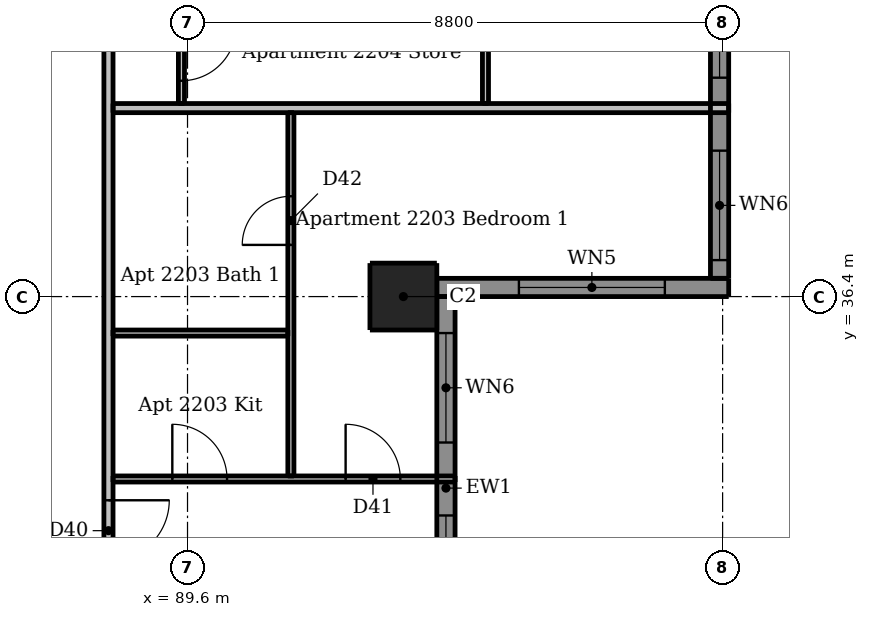
"""IFC4 building model, lengths in metres.
Left out: names, types, materials, properties, quantities, classifications, styles, units other than length and angle.
Written with IfcOpenShell. Run it as: python <this file> out.ifc"""

import sys

from ifc_helpers import new_model, si_unit, direction, frame, frame_2d, origin, origin_2d, place, context, subcontext, project, spatial, rectangle, extrude, element, fill, save


model = new_model("IFC4")
c1 = context("Model", 3, precision=1e-05, world=origin(), true_north=direction((0.0, 1.0)))
c2 = subcontext(c1, "Body", "Model", "MODEL_VIEW")
j1 = project(units=[si_unit("LENGTHUNIT", "METRE"), si_unit("PLANEANGLEUNIT", "RADIAN")], contexts=[c1])
p1 = place(None, origin())
s1 = spatial("IfcSite", under=j1, at=p1, CompositionType="ELEMENT")
p2 = place(p1, origin())
s2 = spatial("IfcBuilding", under=s1, at=p2, CompositionType="ELEMENT")
p3 = place(p2, frame((0.0, 0.0, 85.3)))
s3 = spatial("IfcBuildingStorey", under=s2, at=p3, CompositionType="ELEMENT", Elevation=85.3)
p4 = place(p3, frame((93.15, 36.4, 0.0), z_axis=(0.0, 0.0, 1.0), x_axis=(1.0, 0.0, 0.0)))
e1 = element("IfcColumn", 1, at=p4, inside=s3, PredefinedType="COLUMN", context=c2, shape_type="SweptSolid", body=[
    extrude(rectangle(XDim=1.1, YDim=1.1, at=origin_2d()), origin(), (0.0, 0.0, 1.0), 3.05),
])
p5 = place(p3, frame((93.7, 36.55, 0.0), z_axis=(0.0, 0.0, 1.0), x_axis=(1.0, 0.0, 0.0)))
e2 = element("IfcWall", 2, at=p5, inside=s3, PredefinedType="SOLIDWALL", context=c2, shape_type="SweptSolid", body=[
    extrude(rectangle(XDim=4.8, YDim=0.3, at=frame_2d((2.4, 0.0))), origin(), (0.0, 0.0, 1.0), 3.05),
])
p6 = place(p5, frame((1.35, 0.0, 0.15)))
e3 = element("IfcOpeningElement", 3, at=p6, cuts=e2, PredefinedType="OPENING", context=c2, shape_type="SweptSolid", body=[
    extrude(rectangle(XDim=2.4, YDim=2.1, at=frame_2d((1.2, 1.05))), frame((0.0, 0.16, 0.0), z_axis=(0.0, -1.0, 0.0), x_axis=(1.0, 0.0, 0.0)), (0.0, 0.0, 1.0), 0.32),
])
p7 = place(p3, frame((93.85, 30.1, 0.0), z_axis=(0.0, 0.0, 1.0), x_axis=(0.0, 1.0, 0.0)))
e4 = element("IfcWall", 4, at=p7, inside=s3, PredefinedType="SOLIDWALL", context=c2, shape_type="SweptSolid", body=[
    extrude(rectangle(XDim=6.3, YDim=0.3, at=frame_2d((3.15, 0.0))), origin(), (0.0, 0.0, 1.0), 3.05),
])
p8 = place(p7, frame((0.9, 0.0, 0.15)))
e5 = element("IfcOpeningElement", 5, at=p8, cuts=e4, PredefinedType="OPENING", context=c2, shape_type="SweptSolid", body=[
    extrude(rectangle(XDim=1.8, YDim=2.1, at=frame_2d((0.9, 1.05))), frame((0.0, 0.16, 0.0), z_axis=(0.0, -1.0, 0.0), x_axis=(1.0, 0.0, 0.0)), (0.0, 0.0, 1.0), 0.32),
])
p9 = place(p7, frame((3.9, 0.0, 0.15)))
e6 = element("IfcOpeningElement", 6, at=p9, cuts=e4, PredefinedType="OPENING", context=c2, shape_type="SweptSolid", body=[
    extrude(rectangle(XDim=1.8, YDim=2.1, at=frame_2d((0.9, 1.05))), frame((0.0, 0.16, 0.0), z_axis=(0.0, -1.0, 0.0), x_axis=(1.0, 0.0, 0.0)), (0.0, 0.0, 1.0), 0.32),
])
p10 = place(p3, frame((98.35, 36.7, 0.0), z_axis=(0.0, 0.0, 1.0), x_axis=(0.0, 1.0, 0.0)))
e7 = element("IfcWall", 7, at=p10, inside=s3, PredefinedType="SOLIDWALL", context=c2, shape_type="SweptSolid", body=[
    extrude(rectangle(XDim=5.7, YDim=0.3, at=frame_2d((2.85, 0.0))), origin(), (0.0, 0.0, 1.0), 3.05),
])
p11 = place(p10, frame((0.3, 0.0, 0.15)))
e8 = element("IfcOpeningElement", 8, at=p11, cuts=e7, PredefinedType="OPENING", context=c2, shape_type="SweptSolid", body=[
    extrude(rectangle(XDim=1.8, YDim=2.1, at=frame_2d((0.9, 1.05))), frame((0.0, 0.16, 0.0), z_axis=(0.0, -1.0, 0.0), x_axis=(1.0, 0.0, 0.0)), (0.0, 0.0, 1.0), 0.32),
])
p12 = place(p10, frame((3.3, 0.0, 0.15)))
e9 = element("IfcOpeningElement", 9, at=p12, cuts=e7, PredefinedType="OPENING", context=c2, shape_type="SweptSolid", body=[
    extrude(rectangle(XDim=1.8, YDim=2.1, at=frame_2d((0.9, 1.05))), frame((0.0, 0.16, 0.0), z_axis=(0.0, -1.0, 0.0), x_axis=(1.0, 0.0, 0.0)), (0.0, 0.0, 1.0), 0.32),
])
p13 = place(p3, frame((89.5, 59.35, 0.0), z_axis=(0.0, 0.0, 1.0), x_axis=(0.0, -1.0, 0.0)))
e10 = element("IfcWall", 10, at=p13, inside=s3, PredefinedType="PARTITIONING", context=c2, shape_type="SweptSolid", body=[
    extrude(rectangle(XDim=19.775, YDim=0.1, at=frame_2d((9.888, 0.0))), origin(), (0.0, 0.0, 1.0), 2.51),
])
p14 = place(p13, frame((14.95, 0.0, 0.0)))
e11 = element("IfcOpeningElement", 11, at=p14, cuts=e10, PredefinedType="OPENING", context=c2, shape_type="SweptSolid", body=[
    extrude(rectangle(XDim=0.9, YDim=2.1, at=frame_2d((0.45, 1.05))), frame((0.0, 0.06, 0.0), z_axis=(0.0, -1.0, 0.0), x_axis=(1.0, 0.0, 0.0)), (0.0, 0.0, 1.0), 0.12),
])
p15 = place(p13, frame((9.0, 0.0, 0.0)))
e12 = element("IfcOpeningElement", 12, at=p15, cuts=e10, PredefinedType="OPENING", context=c2, shape_type="SweptSolid", body=[
    extrude(rectangle(XDim=0.9, YDim=2.1, at=frame_2d((0.45, 1.05))), frame((0.0, 0.06, 0.0), z_axis=(0.0, -1.0, 0.0), x_axis=(1.0, 0.0, 0.0)), (0.0, 0.0, 1.0), 0.12),
])
p16 = place(p13, frame((11.4, 0.0, 0.0)))
e13 = element("IfcOpeningElement", 13, at=p16, cuts=e10, PredefinedType="OPENING", context=c2, shape_type="SweptSolid", body=[
    extrude(rectangle(XDim=0.9, YDim=2.1, at=frame_2d((0.45, 1.05))), frame((0.0, 0.06, 0.0), z_axis=(0.0, -1.0, 0.0), x_axis=(1.0, 0.0, 0.0)), (0.0, 0.0, 1.0), 0.12),
])
p17 = place(p13, frame((18.5, 0.0, 0.0)))
e14 = element("IfcOpeningElement", 14, at=p17, cuts=e10, PredefinedType="OPENING", context=c2, shape_type="SweptSolid", body=[
    extrude(rectangle(XDim=0.9, YDim=2.1, at=frame_2d((0.45, 1.05))), frame((0.0, 0.06, 0.0), z_axis=(0.0, -1.0, 0.0), x_axis=(1.0, 0.0, 0.0)), (0.0, 0.0, 1.0), 0.12),
])
p18 = place(p13, frame((6.0, 0.0, 0.0)))
e15 = element("IfcOpeningElement", 15, at=p18, cuts=e10, PredefinedType="OPENING", context=c2, shape_type="SweptSolid", body=[
    extrude(rectangle(XDim=0.9, YDim=2.1, at=frame_2d((0.45, 1.05))), frame((0.0, 0.06, 0.0), z_axis=(0.0, -1.0, 0.0), x_axis=(1.0, 0.0, 0.0)), (0.0, 0.0, 1.0), 0.12),
])
p19 = place(p13, frame((0.85, 0.0, 0.0)))
e16 = element("IfcOpeningElement", 16, at=p19, cuts=e10, PredefinedType="OPENING", context=c2, shape_type="SweptSolid", body=[
    extrude(rectangle(XDim=0.9, YDim=2.1, at=frame_2d((0.45, 1.05))), frame((0.0, 0.06, 0.0), z_axis=(0.0, -1.0, 0.0), x_axis=(1.0, 0.0, 0.0)), (0.0, 0.0, 1.0), 0.12),
])
p20 = place(p13, frame((3.35, 0.0, 0.0)))
e17 = element("IfcOpeningElement", 17, at=p20, cuts=e10, PredefinedType="OPENING", context=c2, shape_type="SweptSolid", body=[
    extrude(rectangle(XDim=0.8, YDim=2.1, at=frame_2d((0.4, 1.05))), frame((0.0, 0.06, 0.0), z_axis=(0.0, -1.0, 0.0), x_axis=(1.0, 0.0, 0.0)), (0.0, 0.0, 1.0), 0.12),
])
p21 = place(p3, frame((91.3, 33.45, 0.0), z_axis=(0.0, 0.0, 1.0), x_axis=(0.0, 1.0, 0.0)))
e18 = element("IfcWall", 18, at=p21, inside=s3, PredefinedType="PARTITIONING", context=c2, shape_type="SweptSolid", body=[
    extrude(rectangle(XDim=5.975, YDim=0.1, at=frame_2d((2.988, 0.0))), origin(), (0.0, 0.0, 1.0), 3.05),
])
p22 = place(p21, frame((3.8, 0.0, 0.0)))
e19 = element("IfcOpeningElement", 19, at=p22, cuts=e18, PredefinedType="OPENING", context=c2, shape_type="SweptSolid", body=[
    extrude(rectangle(XDim=0.8, YDim=2.1, at=frame_2d((0.4, 1.05))), frame((0.0, 0.06, 0.0), z_axis=(0.0, -1.0, 0.0), x_axis=(1.0, 0.0, 0.0)), (0.0, 0.0, 1.0), 0.12),
])
p23 = place(p3, frame((94.5, 39.575, 0.0), z_axis=(0.0, 0.0, 1.0), x_axis=(0.0, 1.0, 0.0)))
e20 = element("IfcWall", 20, at=p23, inside=s3, PredefinedType="PARTITIONING", context=c2, shape_type="SweptSolid", body=[
    extrude(rectangle(XDim=1.775, YDim=0.1, at=frame_2d((0.888, 0.0))), origin(), (0.0, 0.0, 1.0), 3.05),
])
p24 = place(p3, frame((88.375, 35.8, 0.0), z_axis=(0.0, 0.0, 1.0), x_axis=(1.0, 0.0, 0.0)))
e21 = element("IfcWall", 21, at=p24, inside=s3, PredefinedType="PARTITIONING", context=c2, shape_type="SweptSolid", body=[
    extrude(rectangle(XDim=2.875, YDim=0.1, at=frame_2d((1.438, 0.0))), origin(), (0.0, 0.0, 1.0), 3.05),
])
p25 = place(p3, frame((88.375, 33.4, 0.0), z_axis=(0.0, 0.0, 1.0), x_axis=(1.0, 0.0, 0.0)))
e22 = element("IfcWall", 22, at=p25, inside=s3, PredefinedType="PARTITIONING", context=c2, shape_type="SweptSolid", body=[
    extrude(rectangle(XDim=5.625, YDim=0.1, at=frame_2d((2.812, 0.0))), origin(), (0.0, 0.0, 1.0), 3.05),
])
p26 = place(p25, frame((0.975, 0.0, 0.0)))
e23 = element("IfcOpeningElement", 23, at=p26, cuts=e22, PredefinedType="OPENING", context=c2, shape_type="SweptSolid", body=[
    extrude(rectangle(XDim=0.9, YDim=2.1, at=frame_2d((0.45, 1.05))), frame((0.0, 0.06, 0.0), z_axis=(0.0, -1.0, 0.0), x_axis=(1.0, 0.0, 0.0)), (0.0, 0.0, 1.0), 0.12),
])
p27 = place(p25, frame((3.825, 0.0, 0.0)))
e24 = element("IfcOpeningElement", 24, at=p27, cuts=e22, PredefinedType="OPENING", context=c2, shape_type="SweptSolid", body=[
    extrude(rectangle(XDim=0.9, YDim=2.1, at=frame_2d((0.45, 1.05))), frame((0.0, 0.06, 0.0), z_axis=(0.0, -1.0, 0.0), x_axis=(1.0, 0.0, 0.0)), (0.0, 0.0, 1.0), 0.12),
])
p28 = place(p3, frame((88.3, 60.475, 0.0), z_axis=(0.0, 0.0, 1.0), x_axis=(0.0, -1.0, 0.0)))
e25 = element("IfcWall", 25, at=p28, inside=s3, PredefinedType="PARTITIONING", context=c2, shape_type="SweptSolid", body=[
    extrude(rectangle(XDim=28.7, YDim=0.15, at=frame_2d((14.35, 0.0))), origin(), (0.0, 0.0, 1.0), 3.05),
])
p29 = place(p28, frame((27.425, 0.0, 0.0)))
e26 = element("IfcOpeningElement", 26, at=p29, cuts=e25, PredefinedType="OPENING", context=c2, shape_type="SweptSolid", body=[
    extrude(rectangle(XDim=1.0, YDim=2.1, at=frame_2d((0.5, 1.05))), frame((0.0, 0.085, 0.0), z_axis=(0.0, -1.0, 0.0), x_axis=(1.0, 0.0, 0.0)), (0.0, 0.0, 1.0), 0.17),
])
p30 = place(p28, frame((10.575, 0.0, 0.0)))
e27 = element("IfcOpeningElement", 27, at=p30, cuts=e25, PredefinedType="OPENING", context=c2, shape_type="SweptSolid", body=[
    extrude(rectangle(XDim=1.0, YDim=2.1, at=frame_2d((0.5, 1.05))), frame((0.0, 0.085, 0.0), z_axis=(0.0, -1.0, 0.0), x_axis=(1.0, 0.0, 0.0)), (0.0, 0.0, 1.0), 0.17),
])
p31 = place(p3, frame((88.375, 39.5, 0.0), z_axis=(0.0, 0.0, 1.0), x_axis=(1.0, 0.0, 0.0)))
e28 = element("IfcWall", 28, at=p31, inside=s3, PredefinedType="PARTITIONING", context=c2, shape_type="SweptSolid", body=[
    extrude(rectangle(XDim=10.125, YDim=0.15, at=frame_2d((5.062, 0.0))), origin(), (0.0, 0.0, 1.0), 3.05),
])
p32 = place(p6, origin())
e29 = element("IfcWindow", 29, at=p32, inside=s3, PartitioningType="DOUBLE_PANEL_VERTICAL", PredefinedType="WINDOW", context=c2, shape_type="SweptSolid", body=[
    extrude(rectangle(XDim=2.4, YDim=2.1, at=frame_2d((1.2, 1.05))), frame((0.0, 0.03, 0.0), z_axis=(0.0, -1.0, 0.0), x_axis=(1.0, 0.0, 0.0)), (0.0, 0.0, 1.0), 0.06),
])
fill(e3, e29)
p33 = place(p8, origin())
e30 = element("IfcWindow", 30, at=p33, inside=s3, PartitioningType="DOUBLE_PANEL_VERTICAL", PredefinedType="WINDOW", context=c2, shape_type="SweptSolid", body=[
    extrude(rectangle(XDim=1.8, YDim=2.1, at=frame_2d((0.9, 1.05))), frame((0.0, 0.03, 0.0), z_axis=(0.0, -1.0, 0.0), x_axis=(1.0, 0.0, 0.0)), (0.0, 0.0, 1.0), 0.06),
])
fill(e5, e30)
p34 = place(p9, origin())
e31 = element("IfcWindow", 31, at=p34, inside=s3, PartitioningType="DOUBLE_PANEL_VERTICAL", PredefinedType="WINDOW", context=c2, shape_type="SweptSolid", body=[
    extrude(rectangle(XDim=1.8, YDim=2.1, at=frame_2d((0.9, 1.05))), frame((0.0, 0.03, 0.0), z_axis=(0.0, -1.0, 0.0), x_axis=(1.0, 0.0, 0.0)), (0.0, 0.0, 1.0), 0.06),
])
fill(e6, e31)
p35 = place(p11, origin())
e32 = element("IfcWindow", 32, at=p35, inside=s3, PartitioningType="DOUBLE_PANEL_VERTICAL", PredefinedType="WINDOW", context=c2, shape_type="SweptSolid", body=[
    extrude(rectangle(XDim=1.8, YDim=2.1, at=frame_2d((0.9, 1.05))), frame((0.0, 0.03, 0.0), z_axis=(0.0, -1.0, 0.0), x_axis=(1.0, 0.0, 0.0)), (0.0, 0.0, 1.0), 0.06),
])
fill(e8, e32)
p36 = place(p12, origin())
e33 = element("IfcWindow", 33, at=p36, inside=s3, PartitioningType="DOUBLE_PANEL_VERTICAL", PredefinedType="WINDOW", context=c2, shape_type="SweptSolid", body=[
    extrude(rectangle(XDim=1.8, YDim=2.1, at=frame_2d((0.9, 1.05))), frame((0.0, 0.03, 0.0), z_axis=(0.0, -1.0, 0.0), x_axis=(1.0, 0.0, 0.0)), (0.0, 0.0, 1.0), 0.06),
])
fill(e9, e33)
p37 = place(p29, origin())
e34 = element("IfcDoor", 34, at=p37, inside=s3, OperationType="SINGLE_SWING_LEFT", PredefinedType="DOOR", context=c2, shape_type="SweptSolid", body=[
    extrude(rectangle(XDim=1.0, YDim=2.1, at=frame_2d((0.5, 1.05))), frame((0.0, 0.025, 0.0), z_axis=(0.0, -1.0, 0.0), x_axis=(1.0, 0.0, 0.0)), (0.0, 0.0, 1.0), 0.05),
])
fill(e26, e34)
p38 = place(p26, origin())
e35 = element("IfcDoor", 35, at=p38, inside=s3, OperationType="SINGLE_SWING_LEFT", PredefinedType="DOOR", context=c2, shape_type="SweptSolid", body=[
    extrude(rectangle(XDim=0.9, YDim=2.1, at=frame_2d((0.45, 1.05))), frame((0.0, 0.025, 0.0), z_axis=(0.0, -1.0, 0.0), x_axis=(1.0, 0.0, 0.0)), (0.0, 0.0, 1.0), 0.05),
])
fill(e23, e35)
p39 = place(p27, origin())
e36 = element("IfcDoor", 36, at=p39, inside=s3, OperationType="SINGLE_SWING_LEFT", PredefinedType="DOOR", context=c2, shape_type="SweptSolid", body=[
    extrude(rectangle(XDim=0.9, YDim=2.1, at=frame_2d((0.45, 1.05))), frame((0.0, 0.025, 0.0), z_axis=(0.0, -1.0, 0.0), x_axis=(1.0, 0.0, 0.0)), (0.0, 0.0, 1.0), 0.05),
])
fill(e24, e36)
p40 = place(p22, origin())
e37 = element("IfcDoor", 37, at=p40, inside=s3, OperationType="SINGLE_SWING_LEFT", PredefinedType="DOOR", context=c2, shape_type="SweptSolid", body=[
    extrude(rectangle(XDim=0.8, YDim=2.1, at=frame_2d((0.4, 1.05))), frame((0.0, 0.025, 0.0), z_axis=(0.0, -1.0, 0.0), x_axis=(1.0, 0.0, 0.0)), (0.0, 0.0, 1.0), 0.05),
])
fill(e19, e37)
p41 = place(p17, origin())
e38 = element("IfcDoor", 38, at=p41, inside=s3, OperationType="SINGLE_SWING_LEFT", PredefinedType="DOOR", context=c2, shape_type="SweptSolid", body=[
    extrude(rectangle(XDim=0.9, YDim=2.1, at=frame_2d((0.45, 1.05))), frame((0.0, 0.025, 0.0), z_axis=(0.0, -1.0, 0.0), x_axis=(1.0, 0.0, 0.0)), (0.0, 0.0, 1.0), 0.05),
])
fill(e14, e38)
save(model, sys.argv[1])
